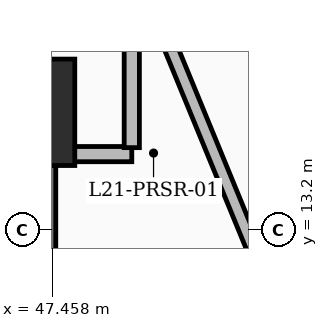
"""IFC4 building model, lengths in metres.
Left out: names, types, materials, properties, quantities, classifications, styles, units other than length and angle.
Written with IfcOpenShell. Run it as: python <this file> out.ifc"""

import sys

from ifc_helpers import new_model, si_unit, direction, frame, frame_2d, origin, origin_2d, place, context, subcontext, project, spatial, rectangle, extrude, element, save


model = new_model("IFC4")
c1 = context("Model", 3, precision=1e-05, world=origin(), true_north=direction((0.0, 1.0)))
c2 = subcontext(c1, "Body", "Model", "MODEL_VIEW")
j1 = project(units=[si_unit("LENGTHUNIT", "METRE"), si_unit("PLANEANGLEUNIT", "RADIAN")], contexts=[c1])
p1 = place(None, origin())
s1 = spatial("IfcSite", under=j1, at=p1, CompositionType="ELEMENT")
p2 = place(p1, origin())
s2 = spatial("IfcBuilding", under=s1, at=p2, CompositionType="ELEMENT")
p3 = place(p2, frame((0.0, 0.0, 85.8)))
s3 = spatial("IfcBuildingStorey", under=s2, at=p3, CompositionType="ELEMENT", Elevation=85.8)
p4 = place(p3, frame((47.05, 14.75, 0.0), z_axis=(0.0, 0.0, 1.0), x_axis=(1.0, 0.0, 0.0)))
e1 = element("IfcColumn", 1, at=p4, inside=s3, PredefinedType="COLUMN", context=c2, shape_type="SweptSolid", body=[
    extrude(rectangle(XDim=1.4, YDim=1.4, at=origin_2d()), origin(), (0.0, 0.0, 1.0), 3.6),
])
p5 = place(p3, frame((47.05, 5.25, 0.0), z_axis=(0.0, 0.0, 1.0), x_axis=(0.0, 1.0, 0.0)))
e2 = element("IfcWall", 2, at=p5, inside=s3, PredefinedType="SHEAR", context=c2, shape_type="SweptSolid", body=[
    extrude(rectangle(XDim=8.8, YDim=0.9, at=frame_2d((4.4, 0.0))), origin(), (0.0, 0.0, 1.0), 3.6),
])
p6 = place(p3, frame((47.5, 14.2, 0.0), z_axis=(0.0, 0.0, 1.0), x_axis=(1.0, 0.0, 0.0)))
e3 = element("IfcWall", 3, at=p6, inside=s3, PredefinedType="PARTITIONING", context=c2, shape_type="SweptSolid", body=[
    extrude(rectangle(XDim=1.0, YDim=0.2, at=frame_2d((0.5, 0.0))), origin(), (0.0, 0.0, 1.0), 3.35),
])
p7 = place(p3, frame((48.5, 14.285, 0.0), z_axis=(0.0, 0.0, 1.0), x_axis=(0.0, 1.0, 0.0)))
e4 = element("IfcWall", 4, at=p7, inside=s3, PredefinedType="PARTITIONING", context=c2, shape_type="SweptSolid", body=[
    extrude(rectangle(XDim=2.039, YDim=0.2, at=frame_2d((1.019, 0.0))), origin(), (0.0, 0.0, 1.0), 2.345),
])
p8 = place(p3, frame((54.639, 1.905, 0.0), z_axis=(0.0, 0.0, 1.0), x_axis=(-0.379959258836, 0.925003222494, 0.0)))
e5 = element("IfcWall", 5, at=p8, inside=s3, PredefinedType="PARTITIONING", context=c2, shape_type="SweptSolid", body=[
    extrude(rectangle(XDim=16.157, YDim=0.175, at=frame_2d((8.078, 0.0))), origin(), (0.0, 0.0, 1.0), 2.345),
])
save(model, sys.argv[1])
